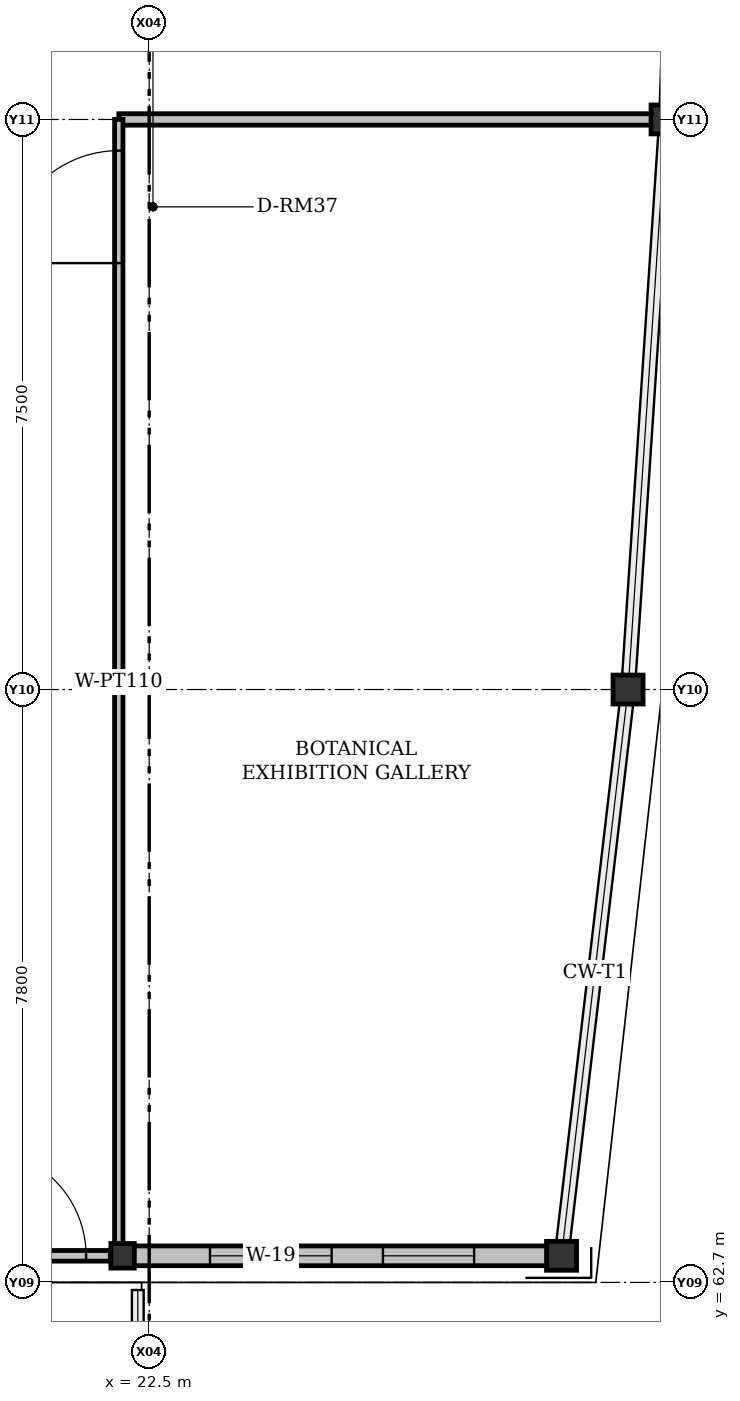
"""IFC4 building model, lengths in metres.
Left out: names, types, materials, properties, quantities, classifications, styles, units other than length and angle.
Written with IfcOpenShell. Run it as: python <this file> out.ifc"""

import sys

from ifc_helpers import new_model, si_unit, direction, frame, frame_2d, origin, origin_2d, place, context, subcontext, project, spatial, rectangle, i_section, extrude, element, fill, save


model = new_model("IFC4")
c1 = context("Model", 3, precision=1e-05, world=origin(), true_north=direction((0.0, 1.0)))
c2 = subcontext(c1, "Body", "Model", "MODEL_VIEW")
j1 = project(units=[si_unit("LENGTHUNIT", "METRE"), si_unit("PLANEANGLEUNIT", "RADIAN")], contexts=[c1])
p1 = place(None, origin())
s1 = spatial("IfcSite", under=j1, at=p1, CompositionType="ELEMENT")
p2 = place(p1, origin())
s2 = spatial("IfcBuilding", under=s1, at=p2, CompositionType="ELEMENT")
p3 = place(p2, frame((0.0, 0.0, 9.9)))
s3 = spatial("IfcBuildingStorey", under=s2, at=p3, CompositionType="ELEMENT", Elevation=9.9)
for number, where, z_axis, x_axis in (
    (1, (27.925, 63.05, 0.0), (0.0, 0.0, 1.0), (1.0, 0.0, 0.0)),
    (2, (28.8, 70.5, 0.0), (0.0, 0.0, 1.0), (1.0, 0.0, 0.0)),
    (3, (29.3, 78.0, 0.0), (0.0, 0.0, 1.0), (1.0, 0.0, 0.0)),
):
    element("IfcColumn", number, at=place(p3, frame(where, z_axis=z_axis, x_axis=x_axis)), inside=s3, PredefinedType="COLUMN", context=c2, shape_type="SweptSolid", body=[
        extrude(i_section(OverallWidth=0.395, OverallDepth=0.38, WebThickness=0.019, FlangeThickness=0.03, FilletRadius=0.015, at=origin_2d()), origin(), (0.0, 0.0, 1.0), 4.2),
    ])
p4 = place(p3, frame((22.15, 63.05, 0.0), z_axis=(0.0, 0.0, 1.0), x_axis=(1.0, 0.0, 0.0)))
e4 = element("IfcColumn", 4, at=p4, inside=s3, PredefinedType="COLUMN", context=c2, shape_type="SweptSolid", body=[
    extrude(i_section(OverallWidth=0.309, OverallDepth=0.323, WebThickness=0.014, FlangeThickness=0.023, FilletRadius=0.015, at=origin_2d()), origin(), (0.0, 0.0, 1.0), 4.2),
])
p5 = place(p3, frame((27.925, 63.05, 0.0), z_axis=(0.0, 0.0, 1.0), x_axis=(-1.0, 0.0, 0.0)))
e5 = element("IfcWall", 5, at=p5, inside=s3, PredefinedType="SOLIDWALL", context=c2, shape_type="SweptSolid", body=[
    extrude(rectangle(XDim=5.775, YDim=0.26, at=frame_2d((2.888, 0.0))), origin(), (0.0, 0.0, 1.0), 3.592),
])
p6 = place(p5, frame((1.15, 0.0, 0.92)))
e6 = element("IfcOpeningElement", 6, at=p6, cuts=e5, PredefinedType="OPENING", context=c2, shape_type="SweptSolid", body=[
    extrude(rectangle(XDim=1.2, YDim=1.7, at=frame_2d((0.6, 0.85))), frame((0.0, 0.13, 0.0), z_axis=(0.0, -1.0, 0.0), x_axis=(1.0, 0.0, 0.0)), (0.0, 0.0, 1.0), 0.26),
])
p7 = place(p5, frame((3.025, 0.0, 0.92)))
e7 = element("IfcOpeningElement", 7, at=p7, cuts=e5, PredefinedType="OPENING", context=c2, shape_type="SweptSolid", body=[
    extrude(rectangle(XDim=1.6, YDim=1.35, at=frame_2d((0.8, 0.675))), frame((0.0, 0.13, 0.0), z_axis=(0.0, -1.0, 0.0), x_axis=(1.0, 0.0, 0.0)), (0.0, 0.0, 1.0), 0.26),
])
p8 = place(p3, frame((22.1, 78.0, 0.0), z_axis=(0.0, 0.0, 1.0), x_axis=(1.0, 0.0, 0.0)))
e8 = element("IfcWall", 8, at=p8, inside=s3, PredefinedType="PARTITIONING", context=c2, shape_type="SweptSolid", body=[
    extrude(rectangle(XDim=7.007, YDim=0.15, at=frame_2d((3.504, 0.0))), origin(), (0.0, 0.0, 1.0), 3.466),
])
p9 = place(p3, frame((19.95, 63.05, 0.0), z_axis=(0.0, 0.0, 1.0), x_axis=(1.0, 0.0, 0.0)))
e9 = element("IfcWall", 9, at=p9, inside=s3, PredefinedType="PARTITIONING", context=c2, shape_type="SweptSolid", body=[
    extrude(rectangle(XDim=2.04, YDim=0.14, at=frame_2d((1.02, 0.0))), origin(), (0.0, 0.0, 1.0), 3.592),
])
p10 = place(p9, frame((0.32, 0.0, 0.0)))
e10 = element("IfcOpeningElement", 10, at=p10, cuts=e9, PredefinedType="OPENING", context=c2, shape_type="SweptSolid", body=[
    extrude(rectangle(XDim=1.4, YDim=2.25, at=frame_2d((0.7, 1.125))), frame((0.0, 0.07, 0.0), z_axis=(0.0, -1.0, 0.0), x_axis=(1.0, 0.0, 0.0)), (0.0, 0.0, 1.0), 0.14),
])
p11 = place(p3, frame((22.1, 63.207, 0.0), z_axis=(0.0, 0.0, 1.0), x_axis=(0.0, 1.0, 0.0)))
e11 = element("IfcWall", 11, at=p11, inside=s3, PredefinedType="PARTITIONING", context=c2, shape_type="SweptSolid", body=[
    extrude(rectangle(XDim=14.793, YDim=0.11, at=frame_2d((7.397, 0.0))), origin(), (0.0, 0.0, 1.0), 3.466),
])
p12 = place(p11, frame((12.904, 0.0, 0.0)))
e12 = element("IfcOpeningElement", 12, at=p12, cuts=e11, PredefinedType="OPENING", context=c2, shape_type="SweptSolid", body=[
    extrude(rectangle(XDim=1.48, YDim=2.28, at=frame_2d((0.74, 1.14))), frame((0.0, 0.055, 0.0), z_axis=(0.0, -1.0, 0.0), x_axis=(1.0, 0.0, 0.0)), (0.0, 0.0, 1.0), 0.11),
])
p13 = place(p6, origin())
e13 = element("IfcWindow", 13, at=p13, inside=s3, PartitioningType="SINGLE_PANEL", PredefinedType="WINDOW", context=c2, shape_type="SweptSolid", body=[
    extrude(rectangle(XDim=1.2, YDim=1.7, at=frame_2d((0.6, 0.85))), frame((0.0, 0.03, 0.0), z_axis=(0.0, -1.0, 0.0), x_axis=(1.0, 0.0, 0.0)), (0.0, 0.0, 1.0), 0.06),
])
fill(e6, e13)
p14 = place(p7, origin())
e14 = element("IfcWindow", 14, at=p14, inside=s3, PartitioningType="DOUBLE_PANEL_VERTICAL", PredefinedType="WINDOW", context=c2, shape_type="SweptSolid", body=[
    extrude(rectangle(XDim=1.6, YDim=1.35, at=frame_2d((0.8, 0.675))), frame((0.0, 0.03, 0.0), z_axis=(0.0, -1.0, 0.0), x_axis=(1.0, 0.0, 0.0)), (0.0, 0.0, 1.0), 0.06),
])
fill(e7, e14)
p15 = place(p10, origin())
e15 = element("IfcDoor", 15, at=p15, inside=s3, OperationType="SINGLE_SWING_LEFT", PredefinedType="DOOR", context=c2, shape_type="SweptSolid", body=[
    extrude(rectangle(XDim=1.4, YDim=2.25, at=frame_2d((0.7, 1.125))), frame((0.0, 0.025, 0.0), z_axis=(0.0, -1.0, 0.0), x_axis=(1.0, 0.0, 0.0)), (0.0, 0.0, 1.0), 0.05),
])
fill(e10, e15)
p16 = place(p12, origin())
e16 = element("IfcDoor", 16, at=p16, inside=s3, OperationType="SINGLE_SWING_LEFT", PredefinedType="DOOR", context=c2, shape_type="SweptSolid", body=[
    extrude(rectangle(XDim=1.48, YDim=2.28, at=frame_2d((0.74, 1.14))), frame((0.0, 0.025, 0.0), z_axis=(0.0, -1.0, 0.0), x_axis=(1.0, 0.0, 0.0)), (0.0, 0.0, 1.0), 0.05),
])
fill(e12, e16)
save(model, sys.argv[1])
